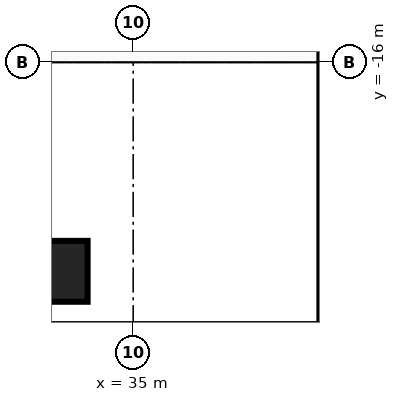
"""IFC4 building model, lengths in metres.
Left out: names, types, materials, properties, quantities, classifications, styles, units other than length and angle.
Written with IfcOpenShell. Run it as: python <this file> out.ifc"""

import sys

from ifc_helpers import new_model, si_unit, direction, frame, origin, origin_2d, place, context, subcontext, project, spatial, rectangle, extrude, source, transform, mapped, element, save


model = new_model("IFC4")
c1 = context("Model", 3, precision=1e-05, world=origin(), true_north=direction((0.0, 1.0)))
c2 = subcontext(c1, "Body", "Model", "MODEL_VIEW")
j1 = project(units=[si_unit("LENGTHUNIT", "METRE"), si_unit("PLANEANGLEUNIT", "RADIAN")], contexts=[c1])
p1 = place(None, origin())
s1 = spatial("IfcSite", under=j1, at=p1, CompositionType="ELEMENT")
p2 = place(p1, origin())
s2 = spatial("IfcBuilding", under=s1, at=p2, CompositionType="ELEMENT")
p3 = place(p2, frame((0.0, 0.0, -9.6)))
s3 = spatial("IfcBuildingStorey", under=s2, at=p3, CompositionType="ELEMENT", Elevation=-9.6)
m1 = source(origin(), c2, "Body", "SweptSolid", [
    extrude(rectangle(XDim=1.6, YDim=1.6, at=origin_2d()), origin(), (0.0, 0.0, 1.0), 4.8),
])
p4 = place(p3, frame((33.0, -21.5, 0.0), z_axis=(0.0, 0.0, 1.0), x_axis=(1.0, 0.0, 0.0)))
e1 = element("IfcColumn", 1, at=p4, inside=s3, PredefinedType="COLUMN", context=c2, shape_type="MappedRepresentation", body=[
    mapped(m1, transform((0.0, 0.0, 0.0), x_axis=(1.0, 0.0, 0.0), y_axis=(0.0, 1.0, 0.0), z_axis=(0.0, 0.0, 1.0), scale=1.0)),
])
save(model, sys.argv[1])
